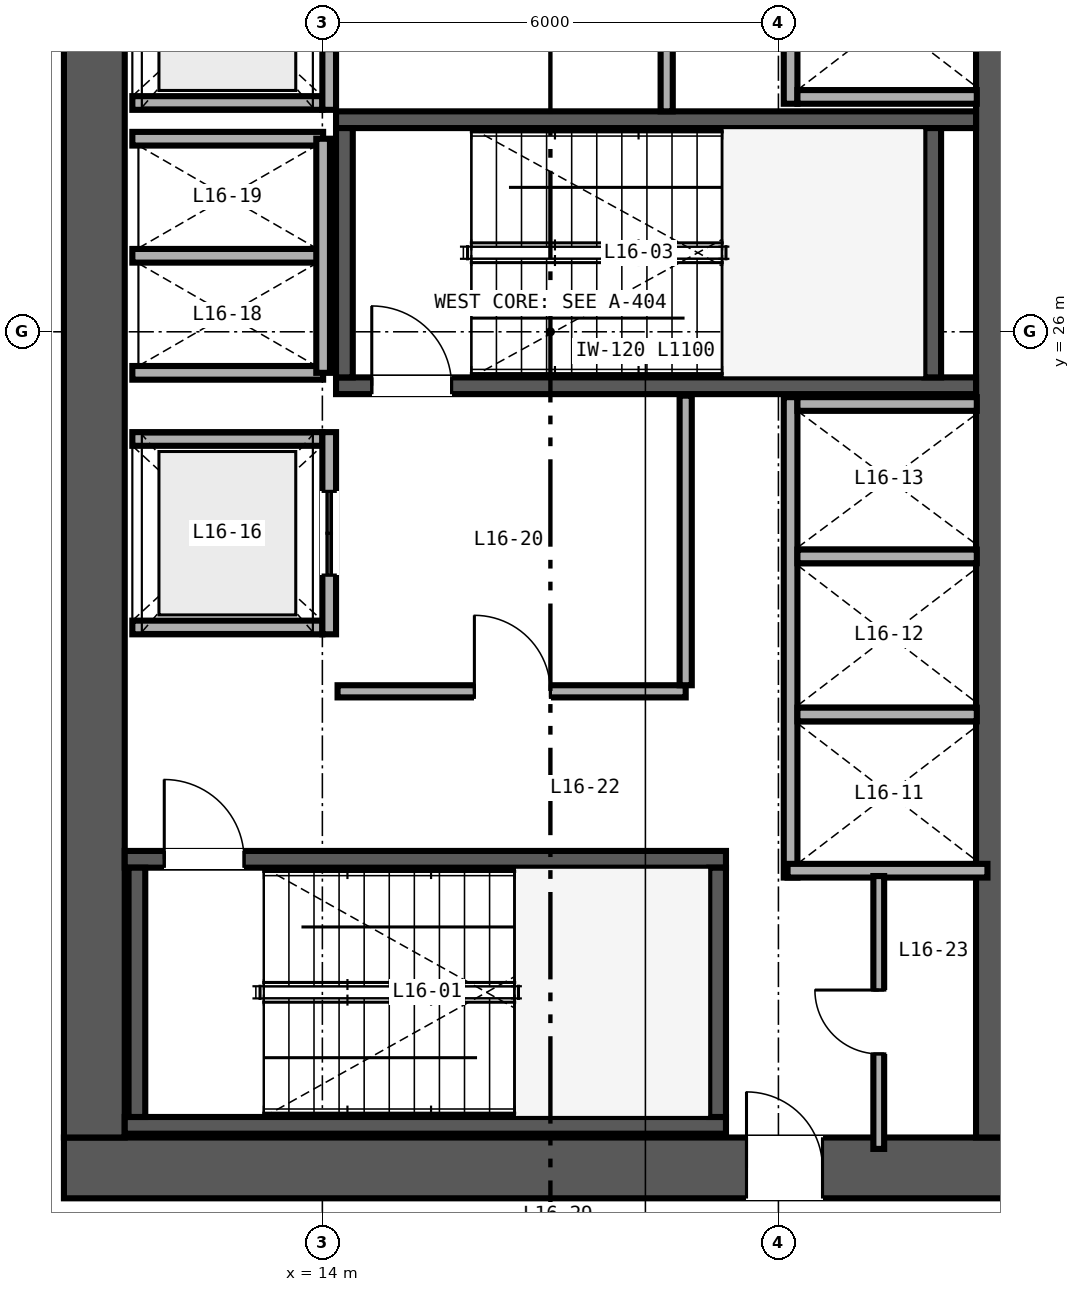
"""IFC4 building model, lengths in metres.
Left out: names, types, materials, properties, quantities, classifications, styles, units other than length and angle.
Written with IfcOpenShell. Run it as: python <this file> out.ifc"""

import sys

from ifc_helpers import new_model, si_unit, direction, frame, frame_2d, origin, place, context, subcontext, project, spatial, rectangle, extrude, source, transform, mapped, element, fill, save


model = new_model("IFC4")
c1 = context("Model", 3, precision=1e-05, world=origin(), true_north=direction((0.0, 1.0)))
c2 = subcontext(c1, "Body", "Model", "MODEL_VIEW")
j1 = project(units=[si_unit("LENGTHUNIT", "METRE"), si_unit("PLANEANGLEUNIT", "RADIAN")], contexts=[c1])
p1 = place(None, origin())
s1 = spatial("IfcSite", under=j1, at=p1, CompositionType="ELEMENT")
p2 = place(p1, origin())
s2 = spatial("IfcBuilding", under=s1, at=p2, CompositionType="ELEMENT")
p3 = place(p2, frame((0.0, 0.0, 67.2)))
s3 = spatial("IfcBuildingStorey", under=s2, at=p3, CompositionType="ELEMENT", Elevation=67.2)
p4 = place(p3, frame((10.6, 15.0, 0.0), z_axis=(0.0, 0.0, 1.0), x_axis=(1.0, 0.0, 0.0)))
e1 = element("IfcWall", 1, at=p4, inside=s3, PredefinedType="SHEAR", context=c2, shape_type="SweptSolid", body=[
    extrude(rectangle(XDim=12.8, YDim=0.8, at=frame_2d((6.4, 0.0))), origin(), (0.0, 0.0, 1.0), 3.35),
])
p5 = place(p4, frame((8.98, 0.0, 0.0)))
e2 = element("IfcOpeningElement", 2, at=p5, cuts=e1, PredefinedType="OPENING", context=c2, shape_type="SweptSolid", body=[
    extrude(rectangle(XDim=1.0, YDim=2.15, at=frame_2d((0.5, 1.075))), frame((0.0, 0.41, 0.0), z_axis=(0.0, -1.0, 0.0), x_axis=(1.0, 0.0, 0.0)), (0.0, 0.0, 1.0), 0.82),
])
for number, where, z_axis, x_axis in (
    (3, (11.0, 15.4, 0.0), (0.0, 0.0, 1.0), (0.0, 1.0, 0.0)),
    (4, (23.0, 15.4, 0.0), (0.0, 0.0, 1.0), (0.0, 1.0, 0.0)),
):
    element("IfcWall", number, at=place(p3, frame(where, z_axis=z_axis, x_axis=x_axis)), inside=s3, PredefinedType="SHEAR", context=c2, shape_type="SweptSolid", body=[
        extrude(rectangle(XDim=21.2, YDim=0.8, at=frame_2d((10.6, 0.0))), origin(), (0.0, 0.0, 1.0), 3.35),
    ])
p6 = place(p3, frame((11.4, 15.56, 0.0), z_axis=(0.0, 0.0, 1.0), x_axis=(1.0, 0.0, 0.0)))
e5 = element("IfcWall", 5, at=p6, inside=s3, PredefinedType="SHEAR", context=c2, shape_type="SweptSolid", body=[
    extrude(rectangle(XDim=7.91, YDim=0.22, at=frame_2d((3.955, 0.0))), origin(), (0.0, 0.0, 1.0), 3.4),
])
p7 = place(p3, frame((11.4, 19.06, 0.0), z_axis=(0.0, 0.0, 1.0), x_axis=(1.0, 0.0, 0.0)))
e6 = element("IfcWall", 6, at=p7, inside=s3, PredefinedType="SHEAR", context=c2, shape_type="SweptSolid", body=[
    extrude(rectangle(XDim=7.91, YDim=0.22, at=frame_2d((3.955, 0.0))), origin(), (0.0, 0.0, 1.0), 3.4),
])
p8 = place(p7, frame((0.52, 0.0, 0.0)))
e7 = element("IfcOpeningElement", 7, at=p8, cuts=e6, PredefinedType="OPENING", context=c2, shape_type="SweptSolid", body=[
    extrude(rectangle(XDim=1.05, YDim=2.15, at=frame_2d((0.525, 1.075))), frame((0.0, 0.12, 0.0), z_axis=(0.0, -1.0, 0.0), x_axis=(1.0, 0.0, 0.0)), (0.0, 0.0, 1.0), 0.24),
])
for number, where, z_axis, x_axis in (
    (8, (11.56, 15.67, 0.0), (0.0, 0.0, 1.0), (0.0, 1.0, 0.0)),
    (9, (19.2, 15.67, 0.0), (0.0, 0.0, 1.0), (0.0, 1.0, 0.0)),
):
    element("IfcWall", number, at=place(p3, frame(where, z_axis=z_axis, x_axis=x_axis)), inside=s3, PredefinedType="SHEAR", context=c2, shape_type="SweptSolid", body=[
        extrude(rectangle(XDim=3.28, YDim=0.22, at=frame_2d((1.64, 0.0))), origin(), (0.0, 0.0, 1.0), 3.4),
    ])
p9 = place(p3, frame((14.18, 25.29, 0.0), z_axis=(0.0, 0.0, 1.0), x_axis=(1.0, 0.0, 0.0)))
e10 = element("IfcWall", 10, at=p9, inside=s3, PredefinedType="SHEAR", context=c2, shape_type="SweptSolid", body=[
    extrude(rectangle(XDim=8.42, YDim=0.22, at=frame_2d((4.21, 0.0))), origin(), (0.0, 0.0, 1.0), 3.4),
])
p10 = place(p9, frame((0.47, 0.0, 0.0)))
e11 = element("IfcOpeningElement", 11, at=p10, cuts=e10, PredefinedType="OPENING", context=c2, shape_type="SweptSolid", body=[
    extrude(rectangle(XDim=1.05, YDim=2.15, at=frame_2d((0.525, 1.075))), frame((0.0, 0.12, 0.0), z_axis=(0.0, -1.0, 0.0), x_axis=(1.0, 0.0, 0.0)), (0.0, 0.0, 1.0), 0.24),
])
p11 = place(p3, frame((14.18, 28.79, 0.0), z_axis=(0.0, 0.0, 1.0), x_axis=(1.0, 0.0, 0.0)))
e12 = element("IfcWall", 12, at=p11, inside=s3, PredefinedType="SHEAR", context=c2, shape_type="SweptSolid", body=[
    extrude(rectangle(XDim=8.42, YDim=0.22, at=frame_2d((4.21, 0.0))), origin(), (0.0, 0.0, 1.0), 3.4),
])
for number, where, z_axis, x_axis in (
    (13, (14.29, 25.4, 0.0), (0.0, 0.0, 1.0), (0.0, 1.0, 0.0)),
    (14, (22.03, 25.4, 0.0), (0.0, 0.0, 1.0), (0.0, 1.0, 0.0)),
):
    element("IfcWall", number, at=place(p3, frame(where, z_axis=z_axis, x_axis=x_axis)), inside=s3, PredefinedType="SHEAR", context=c2, shape_type="SweptSolid", body=[
        extrude(rectangle(XDim=3.28, YDim=0.22, at=frame_2d((1.64, 0.0))), origin(), (0.0, 0.0, 1.0), 3.4),
    ])
p12 = place(p3, frame((20.16, 18.82, 0.0), z_axis=(0.0, 0.0, 1.0), x_axis=(0.0, 1.0, 0.0)))
e15 = element("IfcWall", 15, at=p12, inside=s3, PredefinedType="SOLIDWALL", context=c2, shape_type="SweptSolid", body=[
    extrude(rectangle(XDim=6.32, YDim=0.18, at=frame_2d((3.16, 0.0))), origin(), (0.0, 0.0, 1.0), 2.36),
])
p13 = place(p3, frame((20.12, 18.91, 0.0), z_axis=(0.0, 0.0, 1.0), x_axis=(1.0, 0.0, 0.0)))
e16 = element("IfcWall", 16, at=p13, inside=s3, PredefinedType="SOLIDWALL", context=c2, shape_type="SweptSolid", body=[
    extrude(rectangle(XDim=2.63, YDim=0.18, at=frame_2d((1.315, 0.0))), origin(), (0.0, 0.0, 1.0), 3.35),
])
p14 = place(p3, frame((20.25, 25.05, 0.0), z_axis=(0.0, 0.0, 1.0), x_axis=(1.0, 0.0, 0.0)))
e17 = element("IfcWall", 17, at=p14, inside=s3, PredefinedType="SOLIDWALL", context=c2, shape_type="SweptSolid", body=[
    extrude(rectangle(XDim=2.36, YDim=0.18, at=frame_2d((1.18, 0.0))), origin(), (0.0, 0.0, 1.0), 3.35),
])
p15 = place(p3, frame((20.25, 20.965, 0.0), z_axis=(0.0, 0.0, 1.0), x_axis=(1.0, 0.0, 0.0)))
e18 = element("IfcWall", 18, at=p15, inside=s3, PredefinedType="SOLIDWALL", context=c2, shape_type="SweptSolid", body=[
    extrude(rectangle(XDim=2.36, YDim=0.18, at=frame_2d((1.18, 0.0))), origin(), (0.0, 0.0, 1.0), 2.36),
])
p16 = place(p3, frame((20.25, 23.045, 0.0), z_axis=(0.0, 0.0, 1.0), x_axis=(1.0, 0.0, 0.0)))
e19 = element("IfcWall", 19, at=p16, inside=s3, PredefinedType="SOLIDWALL", context=c2, shape_type="SweptSolid", body=[
    extrude(rectangle(XDim=2.36, YDim=0.18, at=frame_2d((1.18, 0.0))), origin(), (0.0, 0.0, 1.0), 3.35),
])
p17 = place(p3, frame((20.16, 29.0, 0.0), z_axis=(0.0, 0.0, 1.0), x_axis=(0.0, 1.0, 0.0)))
e20 = element("IfcWall", 20, at=p17, inside=s3, PredefinedType="SOLIDWALL", context=c2, shape_type="SweptSolid", body=[
    extrude(rectangle(XDim=4.29, YDim=0.18, at=frame_2d((2.145, 0.0))), origin(), (0.0, 0.0, 1.0), 3.35),
])
p18 = place(p3, frame((20.25, 29.09, 0.0), z_axis=(0.0, 0.0, 1.0), x_axis=(1.0, 0.0, 0.0)))
e21 = element("IfcWall", 21, at=p18, inside=s3, PredefinedType="SOLIDWALL", context=c2, shape_type="SweptSolid", body=[
    extrude(rectangle(XDim=2.36, YDim=0.18, at=frame_2d((1.18, 0.0))), origin(), (0.0, 0.0, 1.0), 3.35),
])
for number, where, z_axis, x_axis in (
    (22, (11.5, 22.11, 0.0), (0.0, 0.0, 1.0), (1.0, 0.0, 0.0)),
    (23, (11.5, 24.59, 0.0), (0.0, 0.0, 1.0), (1.0, 0.0, 0.0)),
):
    element("IfcWall", number, at=place(p3, frame(where, z_axis=z_axis, x_axis=x_axis)), inside=s3, PredefinedType="SOLIDWALL", context=c2, shape_type="SweptSolid", body=[
        extrude(rectangle(XDim=2.5, YDim=0.18, at=frame_2d((1.25, 0.0))), origin(), (0.0, 0.0, 1.0), 3.35),
    ])
p19 = place(p3, frame((14.09, 22.02, 0.0), z_axis=(0.0, 0.0, 1.0), x_axis=(0.0, 1.0, 0.0)))
e24 = element("IfcWall", 24, at=p19, inside=s3, PredefinedType="SOLIDWALL", context=c2, shape_type="SweptSolid", body=[
    extrude(rectangle(XDim=2.66, YDim=0.18, at=frame_2d((1.33, 0.0))), origin(), (0.0, 0.0, 1.0), 3.35),
])
p20 = place(p19, frame((0.78, 0.0, 0.0)))
e25 = element("IfcOpeningElement", 25, at=p20, cuts=e24, PredefinedType="OPENING", context=c2, shape_type="SweptSolid", body=[
    extrude(rectangle(XDim=1.1, YDim=2.2, at=frame_2d((0.55, 1.1))), frame((0.0, 0.1, 0.0), z_axis=(0.0, -1.0, 0.0), x_axis=(1.0, 0.0, 0.0)), (0.0, 0.0, 1.0), 0.2),
])
p21 = place(p3, frame((11.5, 29.01, 0.0), z_axis=(0.0, 0.0, 1.0), x_axis=(1.0, 0.0, 0.0)))
e26 = element("IfcWall", 26, at=p21, inside=s3, PredefinedType="SOLIDWALL", context=c2, shape_type="SweptSolid", body=[
    extrude(rectangle(XDim=2.5, YDim=0.18, at=frame_2d((1.25, 0.0))), origin(), (0.0, 0.0, 1.0), 3.35),
])
p22 = place(p3, frame((14.09, 28.92, 0.0), z_axis=(0.0, 0.0, 1.0), x_axis=(0.0, 1.0, 0.0)))
e27 = element("IfcWall", 27, at=p22, inside=s3, PredefinedType="SOLIDWALL", context=c2, shape_type="SweptSolid", body=[
    extrude(rectangle(XDim=2.66, YDim=0.18, at=frame_2d((1.33, 0.0))), origin(), (0.0, 0.0, 1.0), 3.35),
])
p23 = place(p22, frame((0.78, 0.0, 0.0)))
e28 = element("IfcOpeningElement", 28, at=p23, cuts=e27, PredefinedType="OPENING", context=c2, shape_type="SweptSolid", body=[
    extrude(rectangle(XDim=1.1, YDim=2.2, at=frame_2d((0.55, 1.1))), frame((0.0, 0.1, 0.0), z_axis=(0.0, -1.0, 0.0), x_axis=(1.0, 0.0, 0.0)), (0.0, 0.0, 1.0), 0.2),
])
for number, where, z_axis, x_axis in (
    (29, (11.5, 25.46, 0.0), (0.0, 0.0, 1.0), (1.0, 0.0, 0.0)),
    (30, (11.5, 27.0, 0.0), (0.0, 0.0, 1.0), (1.0, 0.0, 0.0)),
    (31, (11.5, 28.54, 0.0), (0.0, 0.0, 1.0), (1.0, 0.0, 0.0)),
):
    element("IfcWall", number, at=place(p3, frame(where, z_axis=z_axis, x_axis=x_axis)), inside=s3, PredefinedType="SOLIDWALL", context=c2, shape_type="SweptSolid", body=[
        extrude(rectangle(XDim=2.51, YDim=0.18, at=frame_2d((1.255, 0.0))), origin(), (0.0, 0.0, 1.0), 3.35),
    ])
p24 = place(p3, frame((14.01, 25.46, 0.0), z_axis=(0.0, 0.0, 1.0), x_axis=(0.0, 1.0, 0.0)))
e32 = element("IfcWall", 32, at=p24, inside=s3, PredefinedType="SOLIDWALL", context=c2, shape_type="SweptSolid", body=[
    extrude(rectangle(XDim=3.08, YDim=0.18, at=frame_2d((1.54, 0.0))), origin(), (0.0, 0.0, 1.0), 3.35),
])
p25 = place(p3, frame((14.2, 21.27, 0.0), z_axis=(0.0, 0.0, 1.0), x_axis=(1.0, 0.0, 0.0)))
e33 = element("IfcWall", 33, at=p25, inside=s3, PredefinedType="PARTITIONING", context=c2, shape_type="SweptSolid", body=[
    extrude(rectangle(XDim=4.58, YDim=0.16, at=frame_2d((2.29, 0.0))), origin(), (0.0, 0.0, 1.0), 3.35),
])
p26 = place(p25, frame((1.8, 0.0, 0.0)))
e34 = element("IfcOpeningElement", 34, at=p26, cuts=e33, PredefinedType="OPENING", context=c2, shape_type="SweptSolid", body=[
    extrude(rectangle(XDim=1.0, YDim=2.15, at=frame_2d((0.5, 1.075))), frame((0.0, 0.09, 0.0), z_axis=(0.0, -1.0, 0.0), x_axis=(1.0, 0.0, 0.0)), (0.0, 0.0, 1.0), 0.18),
])
p27 = place(p3, frame((18.78, 21.35, 0.0), z_axis=(0.0, 0.0, 1.0), x_axis=(0.0, 1.0, 0.0)))
e35 = element("IfcWall", 35, at=p27, inside=s3, PredefinedType="PARTITIONING", context=c2, shape_type="SweptSolid", body=[
    extrude(rectangle(XDim=3.81, YDim=0.16, at=frame_2d((1.905, 0.0))), origin(), (0.0, 0.0, 1.0), 3.35),
])
p28 = place(p3, frame((18.53, 28.9, 0.0), z_axis=(0.0, 0.0, 1.0), x_axis=(0.0, 1.0, 0.0)))
e36 = element("IfcWall", 36, at=p28, inside=s3, PredefinedType="PARTITIONING", context=c2, shape_type="SweptSolid", body=[
    extrude(rectangle(XDim=3.9, YDim=0.16, at=frame_2d((1.95, 0.0))), origin(), (0.0, 0.0, 1.0), 3.35),
])
p29 = place(p28, frame((1.5, 0.0, 0.0)))
e37 = element("IfcOpeningElement", 37, at=p29, cuts=e36, PredefinedType="OPENING", context=c2, shape_type="SweptSolid", body=[
    extrude(rectangle(XDim=1.0, YDim=2.15, at=frame_2d((0.5, 1.075))), frame((0.0, 0.09, 0.0), z_axis=(0.0, -1.0, 0.0), x_axis=(1.0, 0.0, 0.0)), (0.0, 0.0, 1.0), 0.18),
])
p30 = place(p3, frame((21.32, 15.25, 0.0), z_axis=(0.0, 0.0, 1.0), x_axis=(0.0, 1.0, 0.0)))
e38 = element("IfcWall", 38, at=p30, inside=s3, PredefinedType="PARTITIONING", context=c2, shape_type="SweptSolid", body=[
    extrude(rectangle(XDim=3.59, YDim=0.142, at=frame_2d((1.795, 0.0))), origin(), (0.0, 0.0, 1.0), 3.35),
])
p31 = place(p30, frame((1.25, 0.0, 0.0)))
e39 = element("IfcOpeningElement", 39, at=p31, cuts=e38, PredefinedType="OPENING", context=c2, shape_type="SweptSolid", body=[
    extrude(rectangle(XDim=0.84, YDim=2.1, at=frame_2d((0.42, 1.05))), frame((0.0, 0.081, 0.0), z_axis=(0.0, -1.0, 0.0), x_axis=(1.0, 0.0, 0.0)), (0.0, 0.0, 1.0), 0.162),
])
m1 = source(origin(), c2, "Body", "SweptSolid", [
    extrude(rectangle(XDim=1.05, YDim=2.15, at=frame_2d((0.525, 1.075))), frame((0.0, 0.025, 0.0), z_axis=(0.0, -1.0, 0.0), x_axis=(1.0, 0.0, 0.0)), (0.0, 0.0, 1.0), 0.05),
])
p32 = place(p8, origin())
e40 = element("IfcDoor", 40, at=p32, inside=s3, OperationType="SINGLE_SWING_LEFT", PredefinedType="DOOR", context=c2, shape_type="MappedRepresentation", body=[
    mapped(m1, transform((0.0, 0.0, 0.0), scale=1.0)),
])
fill(e7, e40)
p33 = place(p10, origin())
e41 = element("IfcDoor", 41, at=p33, inside=s3, OperationType="SINGLE_SWING_LEFT", PredefinedType="DOOR", context=c2, shape_type="MappedRepresentation", body=[
    mapped(m1, transform((0.0, 0.0, 0.0), scale=1.0)),
])
fill(e11, e41)
m2 = source(origin(), c2, "Body", "SweptSolid", [
    extrude(rectangle(XDim=1.1, YDim=2.2, at=frame_2d((0.55, 1.1))), frame((0.0, 0.025, 0.0), z_axis=(0.0, -1.0, 0.0), x_axis=(1.0, 0.0, 0.0)), (0.0, 0.0, 1.0), 0.05),
])
p34 = place(p20, origin())
e42 = element("IfcDoor", 42, at=p34, inside=s3, OperationType="DOUBLE_DOOR_SLIDING", PredefinedType="DOOR", context=c2, shape_type="MappedRepresentation", body=[
    mapped(m2, transform((0.0, 0.0, 0.0), scale=1.0)),
])
fill(e25, e42)
m3 = source(origin(), c2, "Body", "SweptSolid", [
    extrude(rectangle(XDim=1.0, YDim=2.15, at=frame_2d((0.5, 1.075))), frame((0.0, 0.025, 0.0), z_axis=(0.0, -1.0, 0.0), x_axis=(1.0, 0.0, 0.0)), (0.0, 0.0, 1.0), 0.05),
])
p35 = place(p26, origin())
e43 = element("IfcDoor", 43, at=p35, inside=s3, OperationType="SINGLE_SWING_LEFT", PredefinedType="DOOR", context=c2, shape_type="MappedRepresentation", body=[
    mapped(m3, transform((0.0, 0.0, 0.0), scale=1.0)),
])
fill(e34, e43)
m4 = source(origin(), c2, "Body", "SweptSolid", [
    extrude(rectangle(XDim=0.84, YDim=2.1, at=frame_2d((0.42, 1.05))), frame((0.0, 0.025, 0.0), z_axis=(0.0, -1.0, 0.0), x_axis=(1.0, 0.0, 0.0)), (0.0, 0.0, 1.0), 0.05),
])
p36 = place(p31, origin())
e44 = element("IfcDoor", 44, at=p36, inside=s3, OperationType="SINGLE_SWING_RIGHT", PredefinedType="DOOR", context=c2, shape_type="MappedRepresentation", body=[
    mapped(m4, transform((0.0, 0.0, 0.0), scale=1.0)),
])
fill(e39, e44)
p37 = place(p5, origin())
e45 = element("IfcDoor", 45, at=p37, inside=s3, OperationType="SINGLE_SWING_LEFT", PredefinedType="DOOR", context=c2, shape_type="MappedRepresentation", body=[
    mapped(m3, transform((0.0, 0.0, 0.0), scale=1.0)),
])
fill(e2, e45)
save(model, sys.argv[1])
